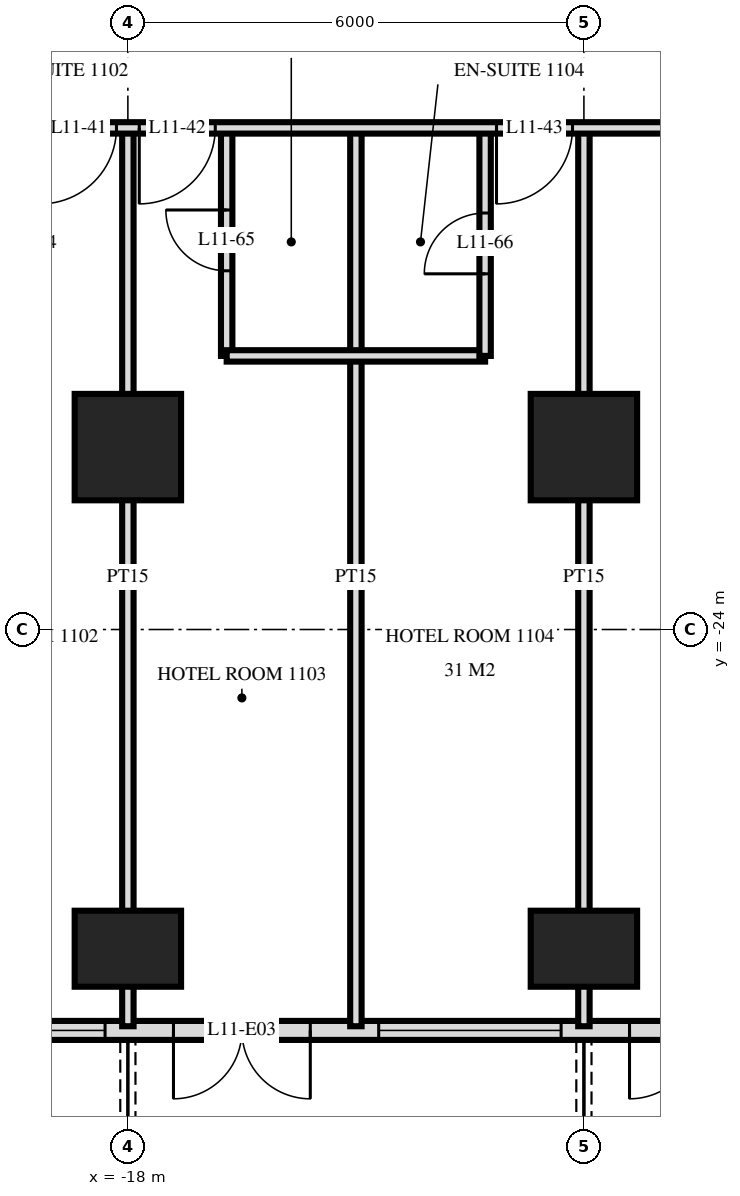
"""IFC4 building model, lengths in metres.
Left out: names, types, materials, properties, quantities, classifications, styles, units other than length and angle.
Written with IfcOpenShell. Run it as: python <this file> out.ifc"""

import sys

from ifc_helpers import new_model, si_unit, direction, frame, frame_2d, origin, origin_2d, place, context, subcontext, project, spatial, rectangle, extrude, element, fill, save


model = new_model("IFC4")
c1 = context("Model", 3, precision=1e-05, world=origin(), true_north=direction((0.0, 1.0)))
c2 = subcontext(c1, "Body", "Model", "MODEL_VIEW")
j1 = project(units=[si_unit("LENGTHUNIT", "METRE"), si_unit("PLANEANGLEUNIT", "RADIAN")], contexts=[c1])
p1 = place(None, origin())
s1 = spatial("IfcSite", under=j1, at=p1, CompositionType="ELEMENT")
p2 = place(p1, origin())
s2 = spatial("IfcBuilding", under=s1, at=p2, CompositionType="ELEMENT")
p3 = place(p2, frame((0.0, 0.0, 49.2)))
s3 = spatial("IfcBuildingStorey", under=s2, at=p3, CompositionType="ELEMENT", Elevation=49.2)
p4 = place(p3, frame((-18.0, -28.2, 0.0), z_axis=(0.0, 0.0, 1.0), x_axis=(1.0, 0.0, 0.0)))
e1 = element("IfcColumn", 1, at=p4, inside=s3, PredefinedType="COLUMN", context=c2, shape_type="SweptSolid", body=[
    extrude(rectangle(XDim=1.4, YDim=1.0, at=origin_2d()), origin(), (0.0, 0.0, 1.0), 3.6),
])
p5 = place(p3, frame((-18.0, -21.6, 0.0), z_axis=(0.0, 0.0, 1.0), x_axis=(1.0, 0.0, 0.0)))
e2 = element("IfcColumn", 2, at=p5, inside=s3, PredefinedType="COLUMN", context=c2, shape_type="SweptSolid", body=[
    extrude(rectangle(XDim=1.4, YDim=1.4, at=origin_2d()), origin(), (0.0, 0.0, 1.0), 3.6),
])
p6 = place(p3, frame((-12.0, -28.2, 0.0), z_axis=(0.0, 0.0, 1.0), x_axis=(1.0, 0.0, 0.0)))
e3 = element("IfcColumn", 3, at=p6, inside=s3, PredefinedType="COLUMN", context=c2, shape_type="SweptSolid", body=[
    extrude(rectangle(XDim=1.4, YDim=1.0, at=origin_2d()), origin(), (0.0, 0.0, 1.0), 3.6),
])
p7 = place(p3, frame((-12.0, -21.6, 0.0), z_axis=(0.0, 0.0, 1.0), x_axis=(1.0, 0.0, 0.0)))
e4 = element("IfcColumn", 4, at=p7, inside=s3, PredefinedType="COLUMN", context=c2, shape_type="SweptSolid", body=[
    extrude(rectangle(XDim=1.4, YDim=1.4, at=origin_2d()), origin(), (0.0, 0.0, 1.0), 3.6),
])
p8 = place(p3, frame((-28.775, -29.275, 0.0), z_axis=(0.0, 0.0, 1.0), x_axis=(1.0, 0.0, 0.0)))
e5 = element("IfcWall", 5, at=p8, inside=s3, PredefinedType="SOLIDWALL", context=c2, shape_type="SweptSolid", body=[
    extrude(rectangle(XDim=57.551, YDim=0.25, at=frame_2d((28.775, 0.0))), origin(), (0.0, 0.0, 1.0), 3.32),
])
p9 = place(p8, frame((0.575, 0.0, 0.0)))
e6 = element("IfcOpeningElement", 6, at=p9, cuts=e5, PredefinedType="OPENING", context=c2, shape_type="SweptSolid", body=[
    extrude(rectangle(XDim=1.8, YDim=2.4, at=frame_2d((0.9, 1.2))), frame((0.0, 0.135, 0.0), z_axis=(0.0, -1.0, 0.0), x_axis=(1.0, 0.0, 0.0)), (0.0, 0.0, 1.0), 0.27),
])
p10 = place(p8, frame((5.375, 0.0, 0.0)))
e7 = element("IfcOpeningElement", 7, at=p10, cuts=e5, PredefinedType="OPENING", context=c2, shape_type="SweptSolid", body=[
    extrude(rectangle(XDim=1.8, YDim=2.4, at=frame_2d((0.9, 1.2))), frame((0.0, 0.135, 0.0), z_axis=(0.0, -1.0, 0.0), x_axis=(1.0, 0.0, 0.0)), (0.0, 0.0, 1.0), 0.27),
])
p11 = place(p8, frame((8.075, 0.0, 0.3)))
e8 = element("IfcOpeningElement", 8, at=p11, cuts=e5, PredefinedType="OPENING", context=c2, shape_type="SweptSolid", body=[
    extrude(rectangle(XDim=2.4, YDim=2.1, at=frame_2d((1.2, 1.05))), frame((0.0, 0.135, 0.0), z_axis=(0.0, -1.0, 0.0), x_axis=(1.0, 0.0, 0.0)), (0.0, 0.0, 1.0), 0.27),
])
p12 = place(p8, frame((11.375, 0.0, 0.0)))
e9 = element("IfcOpeningElement", 9, at=p12, cuts=e5, PredefinedType="OPENING", context=c2, shape_type="SweptSolid", body=[
    extrude(rectangle(XDim=1.8, YDim=2.4, at=frame_2d((0.9, 1.2))), frame((0.0, 0.135, 0.0), z_axis=(0.0, -1.0, 0.0), x_axis=(1.0, 0.0, 0.0)), (0.0, 0.0, 1.0), 0.27),
])
p13 = place(p8, frame((14.075, 0.0, 0.3)))
e10 = element("IfcOpeningElement", 10, at=p13, cuts=e5, PredefinedType="OPENING", context=c2, shape_type="SweptSolid", body=[
    extrude(rectangle(XDim=2.4, YDim=2.1, at=frame_2d((1.2, 1.05))), frame((0.0, 0.135, 0.0), z_axis=(0.0, -1.0, 0.0), x_axis=(1.0, 0.0, 0.0)), (0.0, 0.0, 1.0), 0.27),
])
p14 = place(p8, frame((17.375, 0.0, 0.0)))
e11 = element("IfcOpeningElement", 11, at=p14, cuts=e5, PredefinedType="OPENING", context=c2, shape_type="SweptSolid", body=[
    extrude(rectangle(XDim=1.8, YDim=2.4, at=frame_2d((0.9, 1.2))), frame((0.0, 0.135, 0.0), z_axis=(0.0, -1.0, 0.0), x_axis=(1.0, 0.0, 0.0)), (0.0, 0.0, 1.0), 0.27),
])
p15 = place(p8, frame((20.075, 0.0, 0.3)))
e12 = element("IfcOpeningElement", 12, at=p15, cuts=e5, PredefinedType="OPENING", context=c2, shape_type="SweptSolid", body=[
    extrude(rectangle(XDim=2.4, YDim=2.1, at=frame_2d((1.2, 1.05))), frame((0.0, 0.135, 0.0), z_axis=(0.0, -1.0, 0.0), x_axis=(1.0, 0.0, 0.0)), (0.0, 0.0, 1.0), 0.27),
])
p16 = place(p8, frame((23.075, 0.0, 0.3)))
e13 = element("IfcOpeningElement", 13, at=p16, cuts=e5, PredefinedType="OPENING", context=c2, shape_type="SweptSolid", body=[
    extrude(rectangle(XDim=2.4, YDim=2.1, at=frame_2d((1.2, 1.05))), frame((0.0, 0.135, 0.0), z_axis=(0.0, -1.0, 0.0), x_axis=(1.0, 0.0, 0.0)), (0.0, 0.0, 1.0), 0.27),
])
p17 = place(p8, frame((26.375, 0.0, 0.0)))
e14 = element("IfcOpeningElement", 14, at=p17, cuts=e5, PredefinedType="OPENING", context=c2, shape_type="SweptSolid", body=[
    extrude(rectangle(XDim=1.8, YDim=2.4, at=frame_2d((0.9, 1.2))), frame((0.0, 0.135, 0.0), z_axis=(0.0, -1.0, 0.0), x_axis=(1.0, 0.0, 0.0)), (0.0, 0.0, 1.0), 0.27),
])
p18 = place(p8, frame((29.375, 0.0, 0.0)))
e15 = element("IfcOpeningElement", 15, at=p18, cuts=e5, PredefinedType="OPENING", context=c2, shape_type="SweptSolid", body=[
    extrude(rectangle(XDim=1.8, YDim=2.4, at=frame_2d((0.9, 1.2))), frame((0.0, 0.135, 0.0), z_axis=(0.0, -1.0, 0.0), x_axis=(1.0, 0.0, 0.0)), (0.0, 0.0, 1.0), 0.27),
])
p19 = place(p8, frame((32.075, 0.0, 0.3)))
e16 = element("IfcOpeningElement", 16, at=p19, cuts=e5, PredefinedType="OPENING", context=c2, shape_type="SweptSolid", body=[
    extrude(rectangle(XDim=2.4, YDim=2.1, at=frame_2d((1.2, 1.05))), frame((0.0, 0.135, 0.0), z_axis=(0.0, -1.0, 0.0), x_axis=(1.0, 0.0, 0.0)), (0.0, 0.0, 1.0), 0.27),
])
p20 = place(p8, frame((35.075, 0.0, 0.3)))
e17 = element("IfcOpeningElement", 17, at=p20, cuts=e5, PredefinedType="OPENING", context=c2, shape_type="SweptSolid", body=[
    extrude(rectangle(XDim=2.4, YDim=2.1, at=frame_2d((1.2, 1.05))), frame((0.0, 0.135, 0.0), z_axis=(0.0, -1.0, 0.0), x_axis=(1.0, 0.0, 0.0)), (0.0, 0.0, 1.0), 0.27),
])
p21 = place(p8, frame((38.375, 0.0, 0.0)))
e18 = element("IfcOpeningElement", 18, at=p21, cuts=e5, PredefinedType="OPENING", context=c2, shape_type="SweptSolid", body=[
    extrude(rectangle(XDim=1.8, YDim=2.4, at=frame_2d((0.9, 1.2))), frame((0.0, 0.135, 0.0), z_axis=(0.0, -1.0, 0.0), x_axis=(1.0, 0.0, 0.0)), (0.0, 0.0, 1.0), 0.27),
])
p22 = place(p8, frame((41.375, 0.0, 0.0)))
e19 = element("IfcOpeningElement", 19, at=p22, cuts=e5, PredefinedType="OPENING", context=c2, shape_type="SweptSolid", body=[
    extrude(rectangle(XDim=1.8, YDim=2.4, at=frame_2d((0.9, 1.2))), frame((0.0, 0.135, 0.0), z_axis=(0.0, -1.0, 0.0), x_axis=(1.0, 0.0, 0.0)), (0.0, 0.0, 1.0), 0.27),
])
p23 = place(p8, frame((44.075, 0.0, 0.3)))
e20 = element("IfcOpeningElement", 20, at=p23, cuts=e5, PredefinedType="OPENING", context=c2, shape_type="SweptSolid", body=[
    extrude(rectangle(XDim=2.4, YDim=2.1, at=frame_2d((1.2, 1.05))), frame((0.0, 0.135, 0.0), z_axis=(0.0, -1.0, 0.0), x_axis=(1.0, 0.0, 0.0)), (0.0, 0.0, 1.0), 0.27),
])
p24 = place(p8, frame((47.075, 0.0, 0.3)))
e21 = element("IfcOpeningElement", 21, at=p24, cuts=e5, PredefinedType="OPENING", context=c2, shape_type="SweptSolid", body=[
    extrude(rectangle(XDim=2.4, YDim=2.1, at=frame_2d((1.2, 1.05))), frame((0.0, 0.135, 0.0), z_axis=(0.0, -1.0, 0.0), x_axis=(1.0, 0.0, 0.0)), (0.0, 0.0, 1.0), 0.27),
])
p25 = place(p8, frame((50.375, 0.0, 0.0)))
e22 = element("IfcOpeningElement", 22, at=p25, cuts=e5, PredefinedType="OPENING", context=c2, shape_type="SweptSolid", body=[
    extrude(rectangle(XDim=1.8, YDim=2.4, at=frame_2d((0.9, 1.2))), frame((0.0, 0.135, 0.0), z_axis=(0.0, -1.0, 0.0), x_axis=(1.0, 0.0, 0.0)), (0.0, 0.0, 1.0), 0.27),
])
p26 = place(p8, frame((53.375, 0.0, 0.0)))
e23 = element("IfcOpeningElement", 23, at=p26, cuts=e5, PredefinedType="OPENING", context=c2, shape_type="SweptSolid", body=[
    extrude(rectangle(XDim=1.8, YDim=2.4, at=frame_2d((0.9, 1.2))), frame((0.0, 0.135, 0.0), z_axis=(0.0, -1.0, 0.0), x_axis=(1.0, 0.0, 0.0)), (0.0, 0.0, 1.0), 0.27),
])
p27 = place(p3, frame((-12.0, -29.22, 0.0), z_axis=(0.0, 0.0, 1.0), x_axis=(0.0, 1.0, 0.0)))
e24 = element("IfcWall", 24, at=p27, inside=s3, PredefinedType="PARTITIONING", context=c2, shape_type="SweptSolid", body=[
    extrude(rectangle(XDim=11.82, YDim=0.15, at=frame_2d((5.91, 0.0))), origin(), (0.0, 0.0, 1.0), 3.32),
])
p28 = place(p3, frame((-13.3, -20.4, 0.0), z_axis=(0.0, 0.0, 1.0), x_axis=(0.0, 1.0, 0.0)))
e25 = element("IfcWall", 25, at=p28, inside=s3, PredefinedType="PARTITIONING", context=c2, shape_type="SweptSolid", body=[
    extrude(rectangle(XDim=3.0, YDim=0.15, at=frame_2d((1.5, 0.0))), origin(), (0.0, 0.0, 1.0), 3.32),
])
p29 = place(p28, frame((1.08, 0.0, 0.0)))
e26 = element("IfcOpeningElement", 26, at=p29, cuts=e25, PredefinedType="OPENING", context=c2, shape_type="SweptSolid", body=[
    extrude(rectangle(XDim=0.8, YDim=2.1, at=frame_2d((0.4, 1.05))), frame((0.0, 0.085, 0.0), z_axis=(0.0, -1.0, 0.0), x_axis=(1.0, 0.0, 0.0)), (0.0, 0.0, 1.0), 0.17),
])
p30 = place(p3, frame((-15.0, -29.22, 0.0), z_axis=(0.0, 0.0, 1.0), x_axis=(0.0, 1.0, 0.0)))
e27 = element("IfcWall", 27, at=p30, inside=s3, PredefinedType="PARTITIONING", context=c2, shape_type="SweptSolid", body=[
    extrude(rectangle(XDim=11.82, YDim=0.15, at=frame_2d((5.91, 0.0))), origin(), (0.0, 0.0, 1.0), 3.32),
])
p31 = place(p3, frame((-16.7, -20.4, 0.0), z_axis=(0.0, 0.0, 1.0), x_axis=(0.0, 1.0, 0.0)))
e28 = element("IfcWall", 28, at=p31, inside=s3, PredefinedType="PARTITIONING", context=c2, shape_type="SweptSolid", body=[
    extrude(rectangle(XDim=3.0, YDim=0.15, at=frame_2d((1.5, 0.0))), origin(), (0.0, 0.0, 1.0), 3.32),
])
p32 = place(p31, frame((1.12, 0.0, 0.0)))
e29 = element("IfcOpeningElement", 29, at=p32, cuts=e28, PredefinedType="OPENING", context=c2, shape_type="SweptSolid", body=[
    extrude(rectangle(XDim=0.8, YDim=2.1, at=frame_2d((0.4, 1.05))), frame((0.0, 0.085, 0.0), z_axis=(0.0, -1.0, 0.0), x_axis=(1.0, 0.0, 0.0)), (0.0, 0.0, 1.0), 0.17),
])
p33 = place(p3, frame((-18.0, -29.22, 0.0), z_axis=(0.0, 0.0, 1.0), x_axis=(0.0, 1.0, 0.0)))
e30 = element("IfcWall", 30, at=p33, inside=s3, PredefinedType="PARTITIONING", context=c2, shape_type="SweptSolid", body=[
    extrude(rectangle(XDim=11.82, YDim=0.15, at=frame_2d((5.91, 0.0))), origin(), (0.0, 0.0, 1.0), 3.32),
])
p34 = place(p3, frame((-16.7, -20.4, 0.0), z_axis=(0.0, 0.0, 1.0), x_axis=(1.0, 0.0, 0.0)))
e31 = element("IfcWall", 31, at=p34, inside=s3, PredefinedType="PARTITIONING", context=c2, shape_type="SweptSolid", body=[
    extrude(rectangle(XDim=3.4, YDim=0.15, at=frame_2d((1.7, 0.0))), origin(), (0.0, 0.0, 1.0), 3.32),
])
p35 = place(p3, frame((-33.12, -17.4, 0.0), z_axis=(0.0, 0.0, 1.0), x_axis=(1.0, 0.0, 0.0)))
e32 = element("IfcWall", 32, at=p35, inside=s3, PredefinedType="PARTITIONING", context=c2, shape_type="SweptSolid", body=[
    extrude(rectangle(XDim=66.24, YDim=0.15, at=frame_2d((33.12, 0.0))), origin(), (0.0, 0.0, 1.0), 3.32),
])
p36 = place(p35, frame((9.27, 0.0, 0.0)))
e33 = element("IfcOpeningElement", 33, at=p36, cuts=e32, PredefinedType="OPENING", context=c2, shape_type="SweptSolid", body=[
    extrude(rectangle(XDim=1.0, YDim=2.1, at=frame_2d((0.5, 1.05))), frame((0.0, 0.085, 0.0), z_axis=(0.0, -1.0, 0.0), x_axis=(1.0, 0.0, 0.0)), (0.0, 0.0, 1.0), 0.17),
])
p37 = place(p35, frame((13.97, 0.0, 0.0)))
e34 = element("IfcOpeningElement", 34, at=p37, cuts=e32, PredefinedType="OPENING", context=c2, shape_type="SweptSolid", body=[
    extrude(rectangle(XDim=1.0, YDim=2.1, at=frame_2d((0.5, 1.05))), frame((0.0, 0.085, 0.0), z_axis=(0.0, -1.0, 0.0), x_axis=(1.0, 0.0, 0.0)), (0.0, 0.0, 1.0), 0.17),
])
p38 = place(p35, frame((15.27, 0.0, 0.0)))
e35 = element("IfcOpeningElement", 35, at=p38, cuts=e32, PredefinedType="OPENING", context=c2, shape_type="SweptSolid", body=[
    extrude(rectangle(XDim=1.0, YDim=2.1, at=frame_2d((0.5, 1.05))), frame((0.0, 0.085, 0.0), z_axis=(0.0, -1.0, 0.0), x_axis=(1.0, 0.0, 0.0)), (0.0, 0.0, 1.0), 0.17),
])
p39 = place(p35, frame((19.97, 0.0, 0.0)))
e36 = element("IfcOpeningElement", 36, at=p39, cuts=e32, PredefinedType="OPENING", context=c2, shape_type="SweptSolid", body=[
    extrude(rectangle(XDim=1.0, YDim=2.1, at=frame_2d((0.5, 1.05))), frame((0.0, 0.085, 0.0), z_axis=(0.0, -1.0, 0.0), x_axis=(1.0, 0.0, 0.0)), (0.0, 0.0, 1.0), 0.17),
])
p40 = place(p35, frame((22.27, 0.0, 0.0)))
e37 = element("IfcOpeningElement", 37, at=p40, cuts=e32, PredefinedType="OPENING", context=c2, shape_type="SweptSolid", body=[
    extrude(rectangle(XDim=1.0, YDim=2.1, at=frame_2d((0.5, 1.05))), frame((0.0, 0.085, 0.0), z_axis=(0.0, -1.0, 0.0), x_axis=(1.0, 0.0, 0.0)), (0.0, 0.0, 1.0), 0.17),
])
p41 = place(p35, frame((28.97, 0.0, 0.0)))
e38 = element("IfcOpeningElement", 38, at=p41, cuts=e32, PredefinedType="OPENING", context=c2, shape_type="SweptSolid", body=[
    extrude(rectangle(XDim=1.0, YDim=2.1, at=frame_2d((0.5, 1.05))), frame((0.0, 0.085, 0.0), z_axis=(0.0, -1.0, 0.0), x_axis=(1.0, 0.0, 0.0)), (0.0, 0.0, 1.0), 0.17),
])
p42 = place(p35, frame((30.27, 0.0, 0.0)))
e39 = element("IfcOpeningElement", 39, at=p42, cuts=e32, PredefinedType="OPENING", context=c2, shape_type="SweptSolid", body=[
    extrude(rectangle(XDim=1.0, YDim=2.1, at=frame_2d((0.5, 1.05))), frame((0.0, 0.085, 0.0), z_axis=(0.0, -1.0, 0.0), x_axis=(1.0, 0.0, 0.0)), (0.0, 0.0, 1.0), 0.17),
])
p43 = place(p35, frame((34.97, 0.0, 0.0)))
e40 = element("IfcOpeningElement", 40, at=p43, cuts=e32, PredefinedType="OPENING", context=c2, shape_type="SweptSolid", body=[
    extrude(rectangle(XDim=1.0, YDim=2.1, at=frame_2d((0.5, 1.05))), frame((0.0, 0.085, 0.0), z_axis=(0.0, -1.0, 0.0), x_axis=(1.0, 0.0, 0.0)), (0.0, 0.0, 1.0), 0.17),
])
p44 = place(p35, frame((36.27, 0.0, 0.0)))
e41 = element("IfcOpeningElement", 41, at=p44, cuts=e32, PredefinedType="OPENING", context=c2, shape_type="SweptSolid", body=[
    extrude(rectangle(XDim=1.0, YDim=2.1, at=frame_2d((0.5, 1.05))), frame((0.0, 0.085, 0.0), z_axis=(0.0, -1.0, 0.0), x_axis=(1.0, 0.0, 0.0)), (0.0, 0.0, 1.0), 0.17),
])
p45 = place(p35, frame((39.82, 0.0, 0.0)))
e42 = element("IfcOpeningElement", 42, at=p45, cuts=e32, PredefinedType="OPENING", context=c2, shape_type="SweptSolid", body=[
    extrude(rectangle(XDim=1.0, YDim=2.1, at=frame_2d((0.5, 1.05))), frame((0.0, 0.085, 0.0), z_axis=(0.0, -1.0, 0.0), x_axis=(1.0, 0.0, 0.0)), (0.0, 0.0, 1.0), 0.17),
])
p46 = place(p35, frame((51.27, 0.0, 0.0)))
e43 = element("IfcOpeningElement", 43, at=p46, cuts=e32, PredefinedType="OPENING", context=c2, shape_type="SweptSolid", body=[
    extrude(rectangle(XDim=1.0, YDim=2.1, at=frame_2d((0.5, 1.05))), frame((0.0, 0.085, 0.0), z_axis=(0.0, -1.0, 0.0), x_axis=(1.0, 0.0, 0.0)), (0.0, 0.0, 1.0), 0.17),
])
p47 = place(p35, frame((4.42, 0.0, 0.0)))
e44 = element("IfcOpeningElement", 44, at=p47, cuts=e32, PredefinedType="OPENING", context=c2, shape_type="SweptSolid", body=[
    extrude(rectangle(XDim=1.0, YDim=2.1, at=frame_2d((0.5, 1.05))), frame((0.0, 0.085, 0.0), z_axis=(0.0, -1.0, 0.0), x_axis=(1.0, 0.0, 0.0)), (0.0, 0.0, 1.0), 0.17),
])
p48 = place(p35, frame((54.82, 0.0, 0.0)))
e45 = element("IfcOpeningElement", 45, at=p48, cuts=e32, PredefinedType="OPENING", context=c2, shape_type="SweptSolid", body=[
    extrude(rectangle(XDim=1.0, YDim=2.1, at=frame_2d((0.5, 1.05))), frame((0.0, 0.085, 0.0), z_axis=(0.0, -1.0, 0.0), x_axis=(1.0, 0.0, 0.0)), (0.0, 0.0, 1.0), 0.17),
])
p49 = place(p11, origin())
e46 = element("IfcWindow", 46, at=p49, inside=s3, PartitioningType="SINGLE_PANEL", PredefinedType="WINDOW", context=c2, shape_type="SweptSolid", body=[
    extrude(rectangle(XDim=2.4, YDim=2.1, at=frame_2d((1.2, 1.05))), frame((0.0, 0.03, 0.0), z_axis=(0.0, -1.0, 0.0), x_axis=(1.0, 0.0, 0.0)), (0.0, 0.0, 1.0), 0.06),
])
fill(e8, e46)
p50 = place(p12, frame((0.9, 0.0, 0.0), z_axis=(0.0, 0.0, 1.0), x_axis=(-1.0, 0.0, 0.0)))
e47 = element("IfcDoor", 47, at=p50, inside=s3, OperationType="DOUBLE_DOOR_SINGLE_SWING", PredefinedType="DOOR", context=c2, shape_type="SweptSolid", body=[
    extrude(rectangle(XDim=1.8, YDim=2.4, at=frame_2d((0.0, 1.2))), frame((0.0, -0.025, 0.0), z_axis=(0.0, 1.0, 0.0), x_axis=(-1.0, 0.0, 0.0)), (0.0, 0.0, 1.0), 0.05),
])
fill(e9, e47)
p51 = place(p13, origin())
e48 = element("IfcWindow", 48, at=p51, inside=s3, PartitioningType="SINGLE_PANEL", PredefinedType="WINDOW", context=c2, shape_type="SweptSolid", body=[
    extrude(rectangle(XDim=2.4, YDim=2.1, at=frame_2d((1.2, 1.05))), frame((0.0, 0.03, 0.0), z_axis=(0.0, -1.0, 0.0), x_axis=(1.0, 0.0, 0.0)), (0.0, 0.0, 1.0), 0.06),
])
fill(e10, e48)
p52 = place(p14, frame((0.9, 0.0, 0.0), z_axis=(0.0, 0.0, 1.0), x_axis=(-1.0, 0.0, 0.0)))
e49 = element("IfcDoor", 49, at=p52, inside=s3, OperationType="DOUBLE_DOOR_SINGLE_SWING", PredefinedType="DOOR", context=c2, shape_type="SweptSolid", body=[
    extrude(rectangle(XDim=1.8, YDim=2.4, at=frame_2d((0.0, 1.2))), frame((0.0, -0.025, 0.0), z_axis=(0.0, 1.0, 0.0), x_axis=(-1.0, 0.0, 0.0)), (0.0, 0.0, 1.0), 0.05),
])
fill(e11, e49)
p53 = place(p37, frame((0.5, 0.0, 0.0), z_axis=(0.0, 0.0, 1.0), x_axis=(-1.0, 0.0, 0.0)))
e50 = element("IfcDoor", 50, at=p53, inside=s3, OperationType="SINGLE_SWING_LEFT", PredefinedType="DOOR", context=c2, shape_type="SweptSolid", body=[
    extrude(rectangle(XDim=1.0, YDim=2.1, at=frame_2d((0.0, 1.05))), frame((0.0, -0.025, 0.0), z_axis=(0.0, 1.0, 0.0), x_axis=(-1.0, 0.0, 0.0)), (0.0, 0.0, 1.0), 0.05),
])
fill(e34, e50)
p54 = place(p38, frame((0.5, 0.0, 0.0), z_axis=(0.0, 0.0, 1.0), x_axis=(-1.0, 0.0, 0.0)))
e51 = element("IfcDoor", 51, at=p54, inside=s3, OperationType="SINGLE_SWING_LEFT", PredefinedType="DOOR", context=c2, shape_type="SweptSolid", body=[
    extrude(rectangle(XDim=1.0, YDim=2.1, at=frame_2d((0.0, 1.05))), frame((0.0, -0.025, 0.0), z_axis=(0.0, 1.0, 0.0), x_axis=(-1.0, 0.0, 0.0)), (0.0, 0.0, 1.0), 0.05),
])
fill(e35, e51)
p55 = place(p39, frame((0.5, 0.0, 0.0), z_axis=(0.0, 0.0, 1.0), x_axis=(-1.0, 0.0, 0.0)))
e52 = element("IfcDoor", 52, at=p55, inside=s3, OperationType="SINGLE_SWING_LEFT", PredefinedType="DOOR", context=c2, shape_type="SweptSolid", body=[
    extrude(rectangle(XDim=1.0, YDim=2.1, at=frame_2d((0.0, 1.05))), frame((0.0, -0.025, 0.0), z_axis=(0.0, 1.0, 0.0), x_axis=(-1.0, 0.0, 0.0)), (0.0, 0.0, 1.0), 0.05),
])
fill(e36, e52)
p56 = place(p32, origin())
e53 = element("IfcDoor", 53, at=p56, inside=s3, OperationType="SINGLE_SWING_LEFT", PredefinedType="DOOR", context=c2, shape_type="SweptSolid", body=[
    extrude(rectangle(XDim=0.8, YDim=2.1, at=frame_2d((0.4, 1.05))), frame((0.0, 0.025, 0.0), z_axis=(0.0, -1.0, 0.0), x_axis=(1.0, 0.0, 0.0)), (0.0, 0.0, 1.0), 0.05),
])
fill(e29, e53)
p57 = place(p29, origin())
e54 = element("IfcDoor", 54, at=p57, inside=s3, OperationType="SINGLE_SWING_RIGHT", PredefinedType="DOOR", context=c2, shape_type="SweptSolid", body=[
    extrude(rectangle(XDim=0.8, YDim=2.1, at=frame_2d((0.4, 1.05))), frame((0.0, 0.025, 0.0), z_axis=(0.0, -1.0, 0.0), x_axis=(1.0, 0.0, 0.0)), (0.0, 0.0, 1.0), 0.05),
])
fill(e26, e54)
save(model, sys.argv[1])
